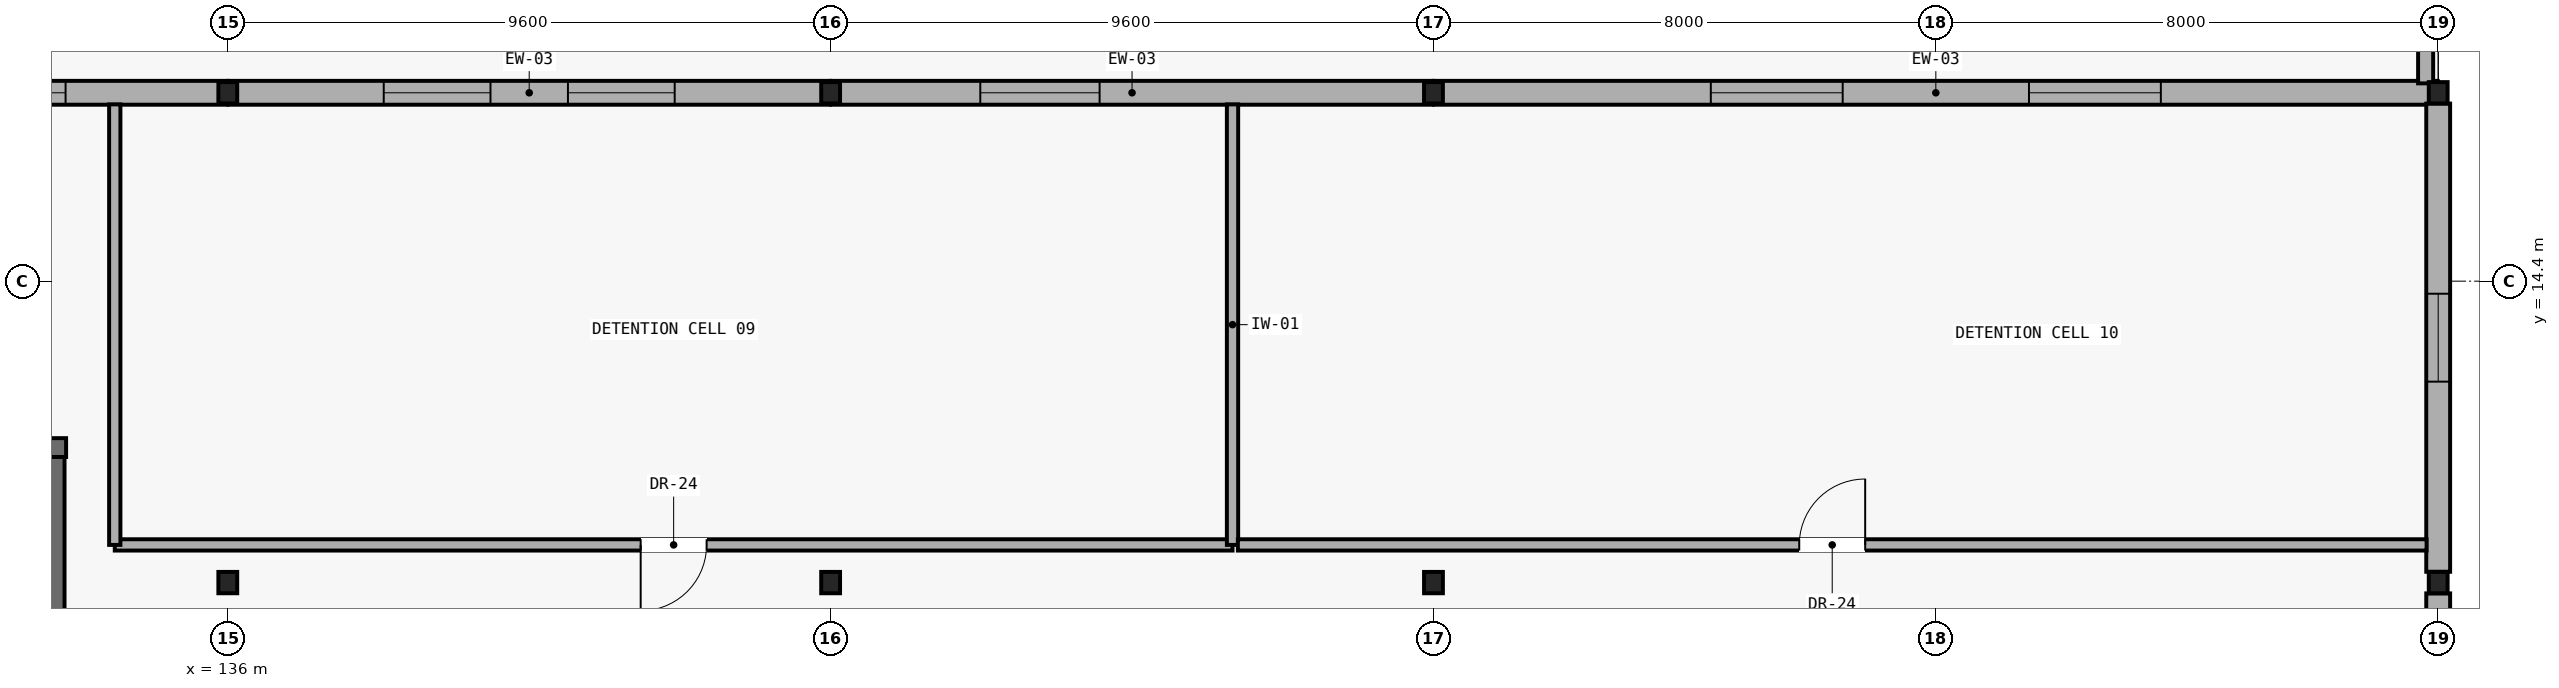
"""IFC4 building model, lengths in metres.
Left out: names, types, materials, properties, quantities, classifications, styles, units other than length and angle.
Written with IfcOpenShell. Run it as: python <this file> out.ifc"""

import sys

from ifc_helpers import new_model, si_unit, direction, frame, frame_2d, origin, origin_2d, place, context, subcontext, project, spatial, rectangle, i_section, extrude, element, fill, save


model = new_model("IFC4")
c1 = context("Model", 3, precision=1e-05, world=origin(), true_north=direction((0.0, 1.0)))
c2 = subcontext(c1, "Body", "Model", "MODEL_VIEW")
j1 = project(units=[si_unit("LENGTHUNIT", "METRE"), si_unit("PLANEANGLEUNIT", "RADIAN")], contexts=[c1])
p1 = place(None, origin())
s1 = spatial("IfcSite", under=j1, at=p1, CompositionType="ELEMENT")
p2 = place(p1, origin())
s2 = spatial("IfcBuilding", under=s1, at=p2, CompositionType="ELEMENT")
p3 = place(p2, frame((0.0, 0.0, 9.45)))
s3 = spatial("IfcBuildingStorey", under=s2, at=p3, CompositionType="ELEMENT", Elevation=9.45)
for number, where, z_axis, x_axis in (
    (1, (136.0, 9.6, 0.0), (0.0, 0.0, 1.0), (1.0, 0.0, 0.0)),
    (2, (136.0, 17.4, 0.0), (0.0, 0.0, 1.0), (1.0, 0.0, 0.0)),
    (3, (145.6, 9.6, 0.0), (0.0, 0.0, 1.0), (1.0, 0.0, 0.0)),
    (4, (145.6, 17.4, 0.0), (0.0, 0.0, 1.0), (1.0, 0.0, 0.0)),
    (5, (155.2, 9.6, 0.0), (0.0, 0.0, 1.0), (1.0, 0.0, 0.0)),
    (6, (155.2, 17.4, 0.0), (0.0, 0.0, 1.0), (1.0, 0.0, 0.0)),
    (7, (171.2, 9.6, 0.0), (0.0, 0.0, 1.0), (1.0, 0.0, 0.0)),
    (8, (171.2, 17.4, 0.0), (0.0, 0.0, 1.0), (1.0, 0.0, 0.0)),
):
    element("IfcColumn", number, at=place(p3, frame(where, z_axis=z_axis, x_axis=x_axis)), inside=s3, PredefinedType="COLUMN", context=c2, shape_type="SweptSolid", body=[
        extrude(i_section(OverallWidth=0.3, OverallDepth=0.34, WebThickness=0.012, FlangeThickness=0.021, FilletRadius=0.027, at=origin_2d()), origin(), (0.0, 0.0, 1.0), 4.2),
    ])
p4 = place(p3, frame((126.408, 17.4, 0.0), z_axis=(0.0, 0.0, 1.0), x_axis=(1.0, 0.0, 0.0)))
e9 = element("IfcWall", 9, at=p4, inside=s3, PredefinedType="SOLIDWALL", context=c2, shape_type="SweptSolid", body=[
    extrude(rectangle(XDim=9.584, YDim=0.38, at=frame_2d((4.792, 0.0))), origin(), (0.0, 0.0, 1.0), 3.64),
])
p5 = place(p4, frame((2.025, 0.0, 1.7)))
e10 = element("IfcOpeningElement", 10, at=p5, cuts=e9, PredefinedType="OPENING", context=c2, shape_type="SweptSolid", body=[
    extrude(rectangle(XDim=1.5, YDim=0.7, at=frame_2d((0.75, 0.35))), frame((0.0, 0.2, 0.0), z_axis=(0.0, -1.0, 0.0), x_axis=(1.0, 0.0, 0.0)), (0.0, 0.0, 1.0), 0.4),
])
p6 = place(p4, frame((5.509, 0.0, 1.7)))
e11 = element("IfcOpeningElement", 11, at=p6, cuts=e9, PredefinedType="OPENING", context=c2, shape_type="SweptSolid", body=[
    extrude(rectangle(XDim=1.5, YDim=0.7, at=frame_2d((0.75, 0.35))), frame((0.0, 0.2, 0.0), z_axis=(0.0, -1.0, 0.0), x_axis=(1.0, 0.0, 0.0)), (0.0, 0.0, 1.0), 0.4),
])
p7 = place(p3, frame((136.008, 17.4, 0.0), z_axis=(0.0, 0.0, 1.0), x_axis=(1.0, 0.0, 0.0)))
e12 = element("IfcWall", 12, at=p7, inside=s3, PredefinedType="SOLIDWALL", context=c2, shape_type="SweptSolid", body=[
    extrude(rectangle(XDim=9.584, YDim=0.38, at=frame_2d((4.792, 0.0))), origin(), (0.0, 0.0, 1.0), 3.64),
])
p8 = place(p7, frame((2.475, 0.0, 1.7)))
e13 = element("IfcOpeningElement", 13, at=p8, cuts=e12, PredefinedType="OPENING", context=c2, shape_type="SweptSolid", body=[
    extrude(rectangle(XDim=1.7, YDim=0.7, at=frame_2d((0.85, 0.35))), frame((0.0, 0.2, 0.0), z_axis=(0.0, -1.0, 0.0), x_axis=(1.0, 0.0, 0.0)), (0.0, 0.0, 1.0), 0.4),
])
p9 = place(p7, frame((5.409, 0.0, 1.7)))
e14 = element("IfcOpeningElement", 14, at=p9, cuts=e12, PredefinedType="OPENING", context=c2, shape_type="SweptSolid", body=[
    extrude(rectangle(XDim=1.7, YDim=0.7, at=frame_2d((0.85, 0.35))), frame((0.0, 0.2, 0.0), z_axis=(0.0, -1.0, 0.0), x_axis=(1.0, 0.0, 0.0)), (0.0, 0.0, 1.0), 0.4),
])
p10 = place(p3, frame((145.608, 17.4, 0.0), z_axis=(0.0, 0.0, 1.0), x_axis=(1.0, 0.0, 0.0)))
e15 = element("IfcWall", 15, at=p10, inside=s3, PredefinedType="SOLIDWALL", context=c2, shape_type="SweptSolid", body=[
    extrude(rectangle(XDim=9.584, YDim=0.38, at=frame_2d((4.792, 0.0))), origin(), (0.0, 0.0, 1.0), 3.655),
])
p11 = place(p10, frame((2.375, 0.0, 1.7)))
e16 = element("IfcOpeningElement", 16, at=p11, cuts=e15, PredefinedType="OPENING", context=c2, shape_type="SweptSolid", body=[
    extrude(rectangle(XDim=1.9, YDim=0.7, at=frame_2d((0.95, 0.35))), frame((0.0, 0.2, 0.0), z_axis=(0.0, -1.0, 0.0), x_axis=(1.0, 0.0, 0.0)), (0.0, 0.0, 1.0), 0.4),
])
p12 = place(p3, frame((155.208, 17.4, 0.0), z_axis=(0.0, 0.0, 1.0), x_axis=(1.0, 0.0, 0.0)))
e17 = element("IfcWall", 17, at=p12, inside=s3, PredefinedType="SOLIDWALL", context=c2, shape_type="SweptSolid", body=[
    extrude(rectangle(XDim=15.984, YDim=0.38, at=frame_2d((7.992, 0.0))), origin(), (0.0, 0.0, 1.0), 3.425),
])
p13 = place(p12, frame((4.409, 0.0, 1.7)))
e18 = element("IfcOpeningElement", 18, at=p13, cuts=e17, PredefinedType="OPENING", context=c2, shape_type="SweptSolid", body=[
    extrude(rectangle(XDim=2.1, YDim=0.7, at=frame_2d((1.05, 0.35))), frame((0.0, 0.2, 0.0), z_axis=(0.0, -1.0, 0.0), x_axis=(1.0, 0.0, 0.0)), (0.0, 0.0, 1.0), 0.4),
])
p14 = place(p12, frame((9.475, 0.0, 1.7)))
e19 = element("IfcOpeningElement", 19, at=p14, cuts=e17, PredefinedType="OPENING", context=c2, shape_type="SweptSolid", body=[
    extrude(rectangle(XDim=2.1, YDim=0.7, at=frame_2d((1.05, 0.35))), frame((0.0, 0.2, 0.0), z_axis=(0.0, -1.0, 0.0), x_axis=(1.0, 0.0, 0.0)), (0.0, 0.0, 1.0), 0.4),
])
p15 = place(p3, frame((171.2, 0.172, 0.0), z_axis=(0.0, 0.0, 1.0), x_axis=(0.0, 1.0, 0.0)))
e20 = element("IfcWall", 20, at=p15, inside=s3, PredefinedType="SOLIDWALL", context=c2, shape_type="SweptSolid", body=[
    extrude(rectangle(XDim=9.256, YDim=0.38, at=frame_2d((4.628, 0.0))), origin(), (0.0, 0.0, 1.0), 3.505),
])
p16 = place(p3, frame((171.2, 9.772, 0.0), z_axis=(0.0, 0.0, 1.0), x_axis=(0.0, 1.0, 0.0)))
e21 = element("IfcWall", 21, at=p16, inside=s3, PredefinedType="SOLIDWALL", context=c2, shape_type="SweptSolid", body=[
    extrude(rectangle(XDim=7.456, YDim=0.38, at=frame_2d((3.728, 0.0))), origin(), (0.0, 0.0, 1.0), 3.525),
])
p17 = place(p16, frame((3.028, 0.0, 1.7)))
e22 = element("IfcOpeningElement", 22, at=p17, cuts=e21, PredefinedType="OPENING", context=c2, shape_type="SweptSolid", body=[
    extrude(rectangle(XDim=1.4, YDim=0.85, at=frame_2d((0.7, 0.425))), frame((0.0, 0.2, 0.0), z_axis=(0.0, -1.0, 0.0), x_axis=(1.0, 0.0, 0.0)), (0.0, 0.0, 1.0), 0.4),
])
p18 = place(p3, frame((171.0, 17.55, 0.0), z_axis=(0.0, 0.0, 1.0), x_axis=(0.0, 1.0, 0.0)))
e23 = element("IfcWall", 23, at=p18, inside=s3, PredefinedType="PARAPET", context=c2, shape_type="SweptSolid", body=[
    extrude(rectangle(XDim=4.65, YDim=0.24, at=frame_2d((2.325, 0.0))), origin(), (0.0, 0.0, 1.0), 1.1),
])
p19 = place(p3, frame((130.925, 11.75, 0.0), z_axis=(0.0, 0.0, 1.0), x_axis=(1.0, 0.0, 0.0)))
e24 = element("IfcWall", 24, at=p19, inside=s3, PredefinedType="SHEAR", context=c2, shape_type="SweptSolid", body=[
    extrude(rectangle(XDim=2.5, YDim=0.3, at=frame_2d((1.25, 0.0))), origin(), (0.0, 0.0, 1.0), 3.97),
])
p20 = place(p3, frame((133.25, 8.95, 0.0), z_axis=(0.0, 0.0, 1.0), x_axis=(0.0, 1.0, 0.0)))
e25 = element("IfcWall", 25, at=p20, inside=s3, PredefinedType="SHEAR", context=c2, shape_type="SweptSolid", body=[
    extrude(rectangle(XDim=2.65, YDim=0.3, at=frame_2d((1.325, 0.0))), origin(), (0.0, 0.0, 1.0), 3.97),
])
p21 = place(p3, frame((134.2, 10.2, 0.0), z_axis=(0.0, 0.0, 1.0), x_axis=(1.0, 0.0, 0.0)))
e26 = element("IfcWall", 26, at=p21, inside=s3, PredefinedType="PARTITIONING", context=c2, shape_type="SweptSolid", body=[
    extrude(rectangle(XDim=17.8, YDim=0.18, at=frame_2d((8.9, 0.0))), origin(), (0.0, 0.0, 1.0), 3.97),
])
p22 = place(p21, frame((8.375, 0.0, 0.0)))
e27 = element("IfcOpeningElement", 27, at=p22, cuts=e26, PredefinedType="OPENING", context=c2, shape_type="SweptSolid", body=[
    extrude(rectangle(XDim=1.05, YDim=2.1, at=frame_2d((0.525, 1.05))), frame((0.0, 0.1, 0.0), z_axis=(0.0, -1.0, 0.0), x_axis=(1.0, 0.0, 0.0)), (0.0, 0.0, 1.0), 0.2),
])
for number, where, z_axis, x_axis in (
    (28, (152.0, 10.2, 0.0), (0.0, 0.0, 1.0), (0.0, 1.0, 0.0)),
    (29, (134.2, 17.215, 0.0), (0.0, 0.0, 1.0), (0.0, -1.0, 0.0)),
):
    element("IfcWall", number, at=place(p3, frame(where, z_axis=z_axis, x_axis=x_axis)), inside=s3, PredefinedType="PARTITIONING", context=c2, shape_type="SweptSolid", body=[
        extrude(rectangle(XDim=7.015, YDim=0.18, at=frame_2d((3.508, 0.0))), origin(), (0.0, 0.0, 1.0), 3.97),
    ])
p23 = place(p3, frame((152.085, 10.2, 0.0), z_axis=(0.0, 0.0, 1.0), x_axis=(1.0, 0.0, 0.0)))
e30 = element("IfcWall", 30, at=p23, inside=s3, PredefinedType="PARTITIONING", context=c2, shape_type="SweptSolid", body=[
    extrude(rectangle(XDim=18.93, YDim=0.18, at=frame_2d((9.465, 0.0))), origin(), (0.0, 0.0, 1.0), 3.97),
])
p24 = place(p23, frame((8.94, 0.0, 0.0)))
e31 = element("IfcOpeningElement", 31, at=p24, cuts=e30, PredefinedType="OPENING", context=c2, shape_type="SweptSolid", body=[
    extrude(rectangle(XDim=1.05, YDim=2.1, at=frame_2d((0.525, 1.05))), frame((0.0, 0.1, 0.0), z_axis=(0.0, -1.0, 0.0), x_axis=(1.0, 0.0, 0.0)), (0.0, 0.0, 1.0), 0.2),
])
p25 = place(p6, origin())
e32 = element("IfcWindow", 32, at=p25, inside=s3, PartitioningType="SINGLE_PANEL", PredefinedType="WINDOW", context=c2, shape_type="SweptSolid", body=[
    extrude(rectangle(XDim=1.5, YDim=0.7, at=frame_2d((0.75, 0.35))), frame((0.0, 0.03, 0.0), z_axis=(0.0, -1.0, 0.0), x_axis=(1.0, 0.0, 0.0)), (0.0, 0.0, 1.0), 0.06),
])
fill(e11, e32)
p26 = place(p8, origin())
e33 = element("IfcWindow", 33, at=p26, inside=s3, PartitioningType="SINGLE_PANEL", PredefinedType="WINDOW", context=c2, shape_type="SweptSolid", body=[
    extrude(rectangle(XDim=1.7, YDim=0.7, at=frame_2d((0.85, 0.35))), frame((0.0, 0.03, 0.0), z_axis=(0.0, -1.0, 0.0), x_axis=(1.0, 0.0, 0.0)), (0.0, 0.0, 1.0), 0.06),
])
fill(e13, e33)
p27 = place(p9, origin())
e34 = element("IfcWindow", 34, at=p27, inside=s3, PartitioningType="SINGLE_PANEL", PredefinedType="WINDOW", context=c2, shape_type="SweptSolid", body=[
    extrude(rectangle(XDim=1.7, YDim=0.7, at=frame_2d((0.85, 0.35))), frame((0.0, 0.03, 0.0), z_axis=(0.0, -1.0, 0.0), x_axis=(1.0, 0.0, 0.0)), (0.0, 0.0, 1.0), 0.06),
])
fill(e14, e34)
p28 = place(p11, origin())
e35 = element("IfcWindow", 35, at=p28, inside=s3, PartitioningType="SINGLE_PANEL", PredefinedType="WINDOW", context=c2, shape_type="SweptSolid", body=[
    extrude(rectangle(XDim=1.9, YDim=0.7, at=frame_2d((0.95, 0.35))), frame((0.0, 0.03, 0.0), z_axis=(0.0, -1.0, 0.0), x_axis=(1.0, 0.0, 0.0)), (0.0, 0.0, 1.0), 0.06),
])
fill(e16, e35)
p29 = place(p13, origin())
e36 = element("IfcWindow", 36, at=p29, inside=s3, PartitioningType="SINGLE_PANEL", PredefinedType="WINDOW", context=c2, shape_type="SweptSolid", body=[
    extrude(rectangle(XDim=2.1, YDim=0.7, at=frame_2d((1.05, 0.35))), frame((0.0, 0.03, 0.0), z_axis=(0.0, -1.0, 0.0), x_axis=(1.0, 0.0, 0.0)), (0.0, 0.0, 1.0), 0.06),
])
fill(e18, e36)
p30 = place(p14, origin())
e37 = element("IfcWindow", 37, at=p30, inside=s3, PartitioningType="SINGLE_PANEL", PredefinedType="WINDOW", context=c2, shape_type="SweptSolid", body=[
    extrude(rectangle(XDim=2.1, YDim=0.7, at=frame_2d((1.05, 0.35))), frame((0.0, 0.03, 0.0), z_axis=(0.0, -1.0, 0.0), x_axis=(1.0, 0.0, 0.0)), (0.0, 0.0, 1.0), 0.06),
])
fill(e19, e37)
p31 = place(p17, origin())
e38 = element("IfcWindow", 38, at=p31, inside=s3, PartitioningType="SINGLE_PANEL", PredefinedType="WINDOW", context=c2, shape_type="SweptSolid", body=[
    extrude(rectangle(XDim=1.4, YDim=0.85, at=frame_2d((0.7, 0.425))), frame((0.0, 0.03, 0.0), z_axis=(0.0, -1.0, 0.0), x_axis=(1.0, 0.0, 0.0)), (0.0, 0.0, 1.0), 0.06),
])
fill(e22, e38)
p32 = place(p22, frame((1.05, 0.0, 0.0), z_axis=(0.0, 0.0, 1.0), x_axis=(-1.0, 0.0, 0.0)))
e39 = element("IfcDoor", 39, at=p32, inside=s3, OperationType="SINGLE_SWING_LEFT", PredefinedType="DOOR", context=c2, shape_type="SweptSolid", body=[
    extrude(rectangle(XDim=1.05, YDim=2.1, at=frame_2d((0.525, 1.05))), frame((0.0, 0.025, 0.0), z_axis=(0.0, -1.0, 0.0), x_axis=(1.0, 0.0, 0.0)), (0.0, 0.0, 1.0), 0.05),
])
fill(e27, e39)
p33 = place(p24, origin())
e40 = element("IfcDoor", 40, at=p33, inside=s3, OperationType="SINGLE_SWING_RIGHT", PredefinedType="DOOR", context=c2, shape_type="SweptSolid", body=[
    extrude(rectangle(XDim=1.05, YDim=2.1, at=frame_2d((0.525, 1.05))), frame((0.0, 0.025, 0.0), z_axis=(0.0, -1.0, 0.0), x_axis=(1.0, 0.0, 0.0)), (0.0, 0.0, 1.0), 0.05),
])
fill(e31, e40)
save(model, sys.argv[1])
